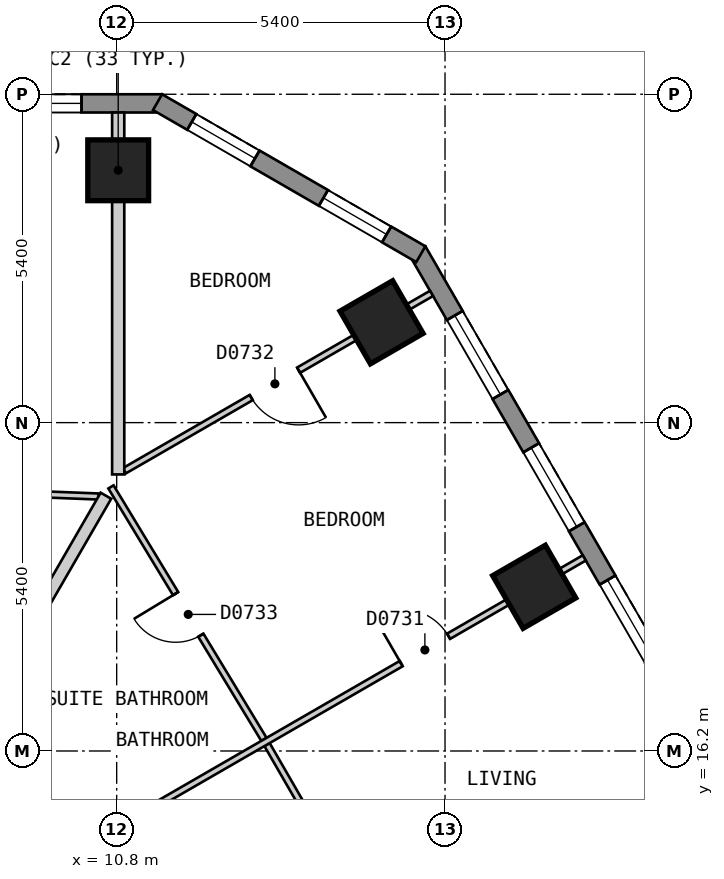
"""IFC4 building model, lengths in metres.
Left out: names, types, materials, properties, quantities, classifications, styles, units other than length and angle.
Written with IfcOpenShell. Run it as: python <this file> out.ifc"""

import sys

from ifc_helpers import new_model, si_unit, direction, frame, frame_2d, origin, origin_2d, place, context, subcontext, project, spatial, polyline, rectangle, outline, extrude, element, fill, save


model = new_model("IFC4")
c1 = context("Model", 3, precision=1e-05, world=origin(), true_north=direction((0.0, 1.0)))
c2 = subcontext(c1, "Body", "Model", "MODEL_VIEW")
j1 = project(units=[si_unit("LENGTHUNIT", "METRE"), si_unit("PLANEANGLEUNIT", "RADIAN")], contexts=[c1])
p1 = place(None, origin())
s1 = spatial("IfcSite", under=j1, at=p1, CompositionType="ELEMENT")
p2 = place(p1, origin())
s2 = spatial("IfcBuilding", under=s1, at=p2, CompositionType="ELEMENT")
p3 = place(p2, frame((0.0, 0.0, 105.0)))
s3 = spatial("IfcBuildingStorey", under=s2, at=p3, CompositionType="ELEMENT", Elevation=105.0)
for number, where, z_axis, x_axis in (
    (1, (10.825, 25.75, 0.0), (0.0, 0.0, 1.0), (-1.0, 0.0, 0.0)),
    (2, (17.667, 18.9, 0.0), (0.0, 0.0, 1.0), (-0.5, 0.866, 0.0)),
    (3, (15.156, 23.25, 0.0), (0.0, 0.0, 1.0), (-0.5, 0.866, 0.0)),
):
    element("IfcColumn", number, at=place(p3, frame(where, z_axis=z_axis, x_axis=x_axis)), inside=s3, PredefinedType="COLUMN", context=c2, shape_type="SweptSolid", body=[
        extrude(rectangle(XDim=1.0, YDim=1.0, at=origin_2d()), origin(), (0.0, 0.0, 1.0), 3.0),
    ])
p4 = place(p3, frame((11.547, 26.85, 0.0), z_axis=(0.0, 0.0, 1.0), x_axis=(-1.0, 0.0, 0.0)))
e4 = element("IfcWall", 4, at=p4, inside=s3, PredefinedType="SOLIDWALL", context=c2, shape_type="SweptSolid", body=[
    extrude(outline(polyline([(0.0, -0.15), (23.094, -0.15), (23.014, 0.15), (0.08, 0.15), (0.0, -0.15)])), origin(), (0.0, 0.0, 1.0), 2.6),
])
p5 = place(p4, frame((1.325, 0.0, 0.15)))
e5 = element("IfcOpeningElement", 5, at=p5, cuts=e4, PredefinedType="OPENING", context=c2, shape_type="SweptSolid", body=[
    extrude(rectangle(XDim=1.5, YDim=2.1, at=frame_2d((0.75, 1.05))), frame((0.0, 0.16, 0.0), z_axis=(0.0, -1.0, 0.0), x_axis=(1.0, 0.0, 0.0)), (0.0, 0.0, 1.0), 0.32),
])
p6 = place(p4, frame((4.032, 0.0, 0.15)))
e6 = element("IfcOpeningElement", 6, at=p6, cuts=e4, PredefinedType="OPENING", context=c2, shape_type="SweptSolid", body=[
    extrude(rectangle(XDim=1.5, YDim=2.1, at=frame_2d((0.75, 1.05))), frame((0.0, 0.16, 0.0), z_axis=(0.0, -1.0, 0.0), x_axis=(1.0, 0.0, 0.0)), (0.0, 0.0, 1.0), 0.32),
])
p7 = place(p4, frame((6.738, 0.0, 0.15)))
e7 = element("IfcOpeningElement", 7, at=p7, cuts=e4, PredefinedType="OPENING", context=c2, shape_type="SweptSolid", body=[
    extrude(rectangle(XDim=1.5, YDim=2.1, at=frame_2d((0.75, 1.05))), frame((0.0, 0.16, 0.0), z_axis=(0.0, -1.0, 0.0), x_axis=(1.0, 0.0, 0.0)), (0.0, 0.0, 1.0), 0.32),
])
p8 = place(p4, frame((9.445, 0.0, 0.15)))
e8 = element("IfcOpeningElement", 8, at=p8, cuts=e4, PredefinedType="OPENING", context=c2, shape_type="SweptSolid", body=[
    extrude(rectangle(XDim=1.5, YDim=2.1, at=frame_2d((0.75, 1.05))), frame((0.0, 0.16, 0.0), z_axis=(0.0, -1.0, 0.0), x_axis=(1.0, 0.0, 0.0)), (0.0, 0.0, 1.0), 0.32),
])
p9 = place(p4, frame((12.151, 0.0, 0.15)))
e9 = element("IfcOpeningElement", 9, at=p9, cuts=e4, PredefinedType="OPENING", context=c2, shape_type="SweptSolid", body=[
    extrude(rectangle(XDim=1.5, YDim=2.1, at=frame_2d((0.75, 1.05))), frame((0.0, 0.16, 0.0), z_axis=(0.0, -1.0, 0.0), x_axis=(1.0, 0.0, 0.0)), (0.0, 0.0, 1.0), 0.32),
])
p10 = place(p4, frame((14.858, 0.0, 0.15)))
e10 = element("IfcOpeningElement", 10, at=p10, cuts=e4, PredefinedType="OPENING", context=c2, shape_type="SweptSolid", body=[
    extrude(rectangle(XDim=1.5, YDim=2.1, at=frame_2d((0.75, 1.05))), frame((0.0, 0.16, 0.0), z_axis=(0.0, -1.0, 0.0), x_axis=(1.0, 0.0, 0.0)), (0.0, 0.0, 1.0), 0.32),
])
p11 = place(p4, frame((17.564, 0.0, 0.15)))
e11 = element("IfcOpeningElement", 11, at=p11, cuts=e4, PredefinedType="OPENING", context=c2, shape_type="SweptSolid", body=[
    extrude(rectangle(XDim=1.5, YDim=2.1, at=frame_2d((0.75, 1.05))), frame((0.0, 0.16, 0.0), z_axis=(0.0, -1.0, 0.0), x_axis=(1.0, 0.0, 0.0)), (0.0, 0.0, 1.0), 0.32),
])
p12 = place(p4, frame((20.271, 0.0, 0.15)))
e12 = element("IfcOpeningElement", 12, at=p12, cuts=e4, PredefinedType="OPENING", context=c2, shape_type="SweptSolid", body=[
    extrude(rectangle(XDim=1.5, YDim=2.1, at=frame_2d((0.75, 1.05))), frame((0.0, 0.16, 0.0), z_axis=(0.0, -1.0, 0.0), x_axis=(1.0, 0.0, 0.0)), (0.0, 0.0, 1.0), 0.32),
])
p13 = place(p3, frame((29.027, 1.425, 0.0), z_axis=(0.0, 0.0, 1.0), x_axis=(-0.500027479704, 0.866009537788, 0.0)))
e13 = element("IfcWall", 13, at=p13, inside=s3, PredefinedType="SOLIDWALL", context=c2, shape_type="SweptSolid", body=[
    extrude(outline(polyline([(0.0, -0.15), (26.559, -0.15), (26.478, 0.15), (0.08, 0.15), (0.0, -0.15)])), origin(), (0.0, 0.0, 1.0), 2.6),
])
p14 = place(p13, frame((1.227, 0.0, 0.15)))
e14 = element("IfcOpeningElement", 14, at=p14, cuts=e13, PredefinedType="OPENING", context=c2, shape_type="SweptSolid", body=[
    extrude(rectangle(XDim=1.5, YDim=2.1, at=frame_2d((0.75, 1.05))), frame((0.0, 0.16, 0.0), z_axis=(0.0, -1.0, 0.0), x_axis=(1.0, 0.0, 0.0)), (0.0, 0.0, 1.0), 0.32),
])
p15 = place(p13, frame((3.738, 0.0, 0.15)))
e15 = element("IfcOpeningElement", 15, at=p15, cuts=e13, PredefinedType="OPENING", context=c2, shape_type="SweptSolid", body=[
    extrude(rectangle(XDim=1.5, YDim=2.1, at=frame_2d((0.75, 1.05))), frame((0.0, 0.16, 0.0), z_axis=(0.0, -1.0, 0.0), x_axis=(1.0, 0.0, 0.0)), (0.0, 0.0, 1.0), 0.32),
])
p16 = place(p13, frame((6.25, 0.0, 0.15)))
e16 = element("IfcOpeningElement", 16, at=p16, cuts=e13, PredefinedType="OPENING", context=c2, shape_type="SweptSolid", body=[
    extrude(rectangle(XDim=1.5, YDim=2.1, at=frame_2d((0.75, 1.05))), frame((0.0, 0.16, 0.0), z_axis=(0.0, -1.0, 0.0), x_axis=(1.0, 0.0, 0.0)), (0.0, 0.0, 1.0), 0.32),
])
p17 = place(p13, frame((8.761, 0.0, 0.15)))
e17 = element("IfcOpeningElement", 17, at=p17, cuts=e13, PredefinedType="OPENING", context=c2, shape_type="SweptSolid", body=[
    extrude(rectangle(XDim=1.5, YDim=2.1, at=frame_2d((0.75, 1.05))), frame((0.0, 0.16, 0.0), z_axis=(0.0, -1.0, 0.0), x_axis=(1.0, 0.0, 0.0)), (0.0, 0.0, 1.0), 0.32),
])
p18 = place(p13, frame((11.273, 0.0, 0.15)))
e18 = element("IfcOpeningElement", 18, at=p18, cuts=e13, PredefinedType="OPENING", context=c2, shape_type="SweptSolid", body=[
    extrude(rectangle(XDim=1.5, YDim=2.1, at=frame_2d((0.75, 1.05))), frame((0.0, 0.16, 0.0), z_axis=(0.0, -1.0, 0.0), x_axis=(1.0, 0.0, 0.0)), (0.0, 0.0, 1.0), 0.32),
])
p19 = place(p13, frame((13.785, 0.0, 0.15)))
e19 = element("IfcOpeningElement", 19, at=p19, cuts=e13, PredefinedType="OPENING", context=c2, shape_type="SweptSolid", body=[
    extrude(rectangle(XDim=1.5, YDim=2.1, at=frame_2d((0.75, 1.05))), frame((0.0, 0.16, 0.0), z_axis=(0.0, -1.0, 0.0), x_axis=(1.0, 0.0, 0.0)), (0.0, 0.0, 1.0), 0.32),
])
p20 = place(p13, frame((16.296, 0.0, 0.15)))
e20 = element("IfcOpeningElement", 20, at=p20, cuts=e13, PredefinedType="OPENING", context=c2, shape_type="SweptSolid", body=[
    extrude(rectangle(XDim=1.5, YDim=2.1, at=frame_2d((0.75, 1.05))), frame((0.0, 0.16, 0.0), z_axis=(0.0, -1.0, 0.0), x_axis=(1.0, 0.0, 0.0)), (0.0, 0.0, 1.0), 0.32),
])
p21 = place(p13, frame((18.807, 0.0, 0.15)))
e21 = element("IfcOpeningElement", 21, at=p21, cuts=e13, PredefinedType="OPENING", context=c2, shape_type="SweptSolid", body=[
    extrude(rectangle(XDim=1.5, YDim=2.1, at=frame_2d((0.75, 1.05))), frame((0.0, 0.16, 0.0), z_axis=(0.0, -1.0, 0.0), x_axis=(1.0, 0.0, 0.0)), (0.0, 0.0, 1.0), 0.32),
])
p22 = place(p13, frame((21.319, 0.0, 0.15)))
e22 = element("IfcOpeningElement", 22, at=p22, cuts=e13, PredefinedType="OPENING", context=c2, shape_type="SweptSolid", body=[
    extrude(rectangle(XDim=1.5, YDim=2.1, at=frame_2d((0.75, 1.05))), frame((0.0, 0.16, 0.0), z_axis=(0.0, -1.0, 0.0), x_axis=(1.0, 0.0, 0.0)), (0.0, 0.0, 1.0), 0.32),
])
p23 = place(p13, frame((23.831, 0.0, 0.15)))
e23 = element("IfcOpeningElement", 23, at=p23, cuts=e13, PredefinedType="OPENING", context=c2, shape_type="SweptSolid", body=[
    extrude(rectangle(XDim=1.5, YDim=2.1, at=frame_2d((0.75, 1.05))), frame((0.0, 0.16, 0.0), z_axis=(0.0, -1.0, 0.0), x_axis=(1.0, 0.0, 0.0)), (0.0, 0.0, 1.0), 0.32),
])
p24 = place(p3, frame((15.802, 24.37, 0.0), z_axis=(0.0, 0.0, 1.0), x_axis=(-0.866022959057, 0.500004234368, 0.0)))
e24 = element("IfcWall", 24, at=p24, inside=s3, PredefinedType="SOLIDWALL", context=c2, shape_type="SweptSolid", body=[
    extrude(outline(polyline([(0.0, -0.15), (5.0, -0.15), (4.92, 0.15), (0.08, 0.15), (0.0, -0.15)])), origin(), (0.0, 0.0, 1.0), 2.6),
])
p25 = place(p24, frame((0.65, 0.0, 0.15)))
e25 = element("IfcOpeningElement", 25, at=p25, cuts=e24, PredefinedType="OPENING", context=c2, shape_type="SweptSolid", body=[
    extrude(rectangle(XDim=1.2, YDim=2.1, at=frame_2d((0.6, 1.05))), frame((0.0, 0.16, 0.0), z_axis=(0.0, -1.0, 0.0), x_axis=(1.0, 0.0, 0.0)), (0.0, 0.0, 1.0), 0.32),
])
p26 = place(p24, frame((3.15, 0.0, 0.15)))
e26 = element("IfcOpeningElement", 26, at=p26, cuts=e24, PredefinedType="OPENING", context=c2, shape_type="SweptSolid", body=[
    extrude(rectangle(XDim=1.2, YDim=2.1, at=frame_2d((0.6, 1.05))), frame((0.0, 0.16, 0.0), z_axis=(0.0, -1.0, 0.0), x_axis=(1.0, 0.0, 0.0)), (0.0, 0.0, 1.0), 0.32),
])
p27 = place(p3, frame((8.488, 16.5, 0.0), z_axis=(0.0, 0.0, 1.0), x_axis=(0.499986836607, -0.86603300354, 0.0)))
e27 = element("IfcWall", 27, at=p27, inside=s3, PredefinedType="PARTITIONING", context=c2, shape_type="SweptSolid", body=[
    extrude(rectangle(XDim=20.09, YDim=0.2, at=frame_2d((10.045, 0.0))), origin(), (0.0, 0.0, 1.0), 2.6),
])
p28 = place(p27, frame((14.569, 0.0, 0.0)))
e28 = element("IfcOpeningElement", 28, at=p28, cuts=e27, PredefinedType="OPENING", context=c2, shape_type="SweptSolid", body=[
    extrude(rectangle(XDim=1.0, YDim=2.1, at=frame_2d((0.5, 1.05))), frame((0.0, 0.11, 0.0), z_axis=(0.0, -1.0, 0.0), x_axis=(1.0, 0.0, 0.0)), (0.0, 0.0, 1.0), 0.22),
])
p29 = place(p27, frame((4.547, 0.0, 0.0)))
e29 = element("IfcOpeningElement", 29, at=p29, cuts=e27, PredefinedType="OPENING", context=c2, shape_type="SweptSolid", body=[
    extrude(rectangle(XDim=1.0, YDim=2.1, at=frame_2d((0.5, 1.05))), frame((0.0, 0.11, 0.0), z_axis=(0.0, -1.0, 0.0), x_axis=(1.0, 0.0, 0.0)), (0.0, 0.0, 1.0), 0.22),
])
p30 = place(p3, frame((10.706, 20.543, 0.0), z_axis=(0.0, 0.0, 1.0), x_axis=(0.518240414093, -0.855234981278, 0.0)))
e30 = element("IfcWall", 30, at=p30, inside=s3, PredefinedType="PARTITIONING", context=c2, shape_type="SweptSolid", body=[
    extrude(rectangle(XDim=4.855, YDim=0.1, at=frame_2d((2.427, 0.0))), origin(), (0.0, 0.0, 1.0), 2.6),
])
p31 = place(p30, frame((2.052, 0.0, 0.0)))
e31 = element("IfcOpeningElement", 31, at=p31, cuts=e30, PredefinedType="OPENING", context=c2, shape_type="SweptSolid", body=[
    extrude(rectangle(XDim=0.8, YDim=2.1, at=frame_2d((0.4, 1.05))), frame((0.0, 0.06, 0.0), z_axis=(0.0, -1.0, 0.0), x_axis=(1.0, 0.0, 0.0)), (0.0, 0.0, 1.0), 0.12),
])
p32 = place(p3, frame((13.273, 16.305, 0.0), z_axis=(0.0, 0.0, 1.0), x_axis=(0.500093956194, -0.865971151354, 0.0)))
e32 = element("IfcWall", 32, at=p32, inside=s3, PredefinedType="PARTITIONING", context=c2, shape_type="SweptSolid", body=[
    extrude(rectangle(XDim=4.873, YDim=0.1, at=frame_2d((2.437, 0.0))), origin(), (0.0, 0.0, 1.0), 2.6),
])
p33 = place(p32, frame((1.987, 0.0, 0.0)))
e33 = element("IfcOpeningElement", 33, at=p33, cuts=e32, PredefinedType="OPENING", context=c2, shape_type="SweptSolid", body=[
    extrude(rectangle(XDim=0.9, YDim=2.1, at=frame_2d((0.45, 1.05))), frame((0.0, 0.06, 0.0), z_axis=(0.0, -1.0, 0.0), x_axis=(1.0, 0.0, 0.0)), (0.0, 0.0, 1.0), 0.12),
])
p34 = place(p3, frame((8.06, 20.48, 0.0), z_axis=(0.0, 0.0, 1.0), x_axis=(0.999243345912, -0.038893902497, 0.0)))
e34 = element("IfcWall", 34, at=p34, inside=s3, PredefinedType="PARTITIONING", context=c2, shape_type="SweptSolid", body=[
    extrude(rectangle(XDim=2.442, YDim=0.1, at=frame_2d((1.221, 0.0))), origin(), (0.0, 0.0, 1.0), 2.6),
])
p35 = place(p3, frame((9.83, 14.375, 0.0), z_axis=(0.0, 0.0, 1.0), x_axis=(0.866016855193, 0.500014806302, 0.0)))
e35 = element("IfcWall", 35, at=p35, inside=s3, PredefinedType="PARTITIONING", context=c2, shape_type="SweptSolid", body=[
    extrude(rectangle(XDim=10.0, YDim=0.1, at=frame_2d((5.0, 0.0))), origin(), (0.0, 0.0, 1.0), 2.6),
])
p36 = place(p35, frame((6.523, 0.0, 0.0)))
e36 = element("IfcOpeningElement", 36, at=p36, cuts=e35, PredefinedType="OPENING", context=c2, shape_type="SweptSolid", body=[
    extrude(rectangle(XDim=0.9, YDim=2.1, at=frame_2d((0.45, 1.05))), frame((0.0, 0.06, 0.0), z_axis=(0.0, -1.0, 0.0), x_axis=(1.0, 0.0, 0.0)), (0.0, 0.0, 1.0), 0.12),
])
p37 = place(p3, frame((10.926, 20.808, 0.0), z_axis=(0.0, 0.0, 1.0), x_axis=(0.86600925905, 0.500027962457, 0.0)))
e37 = element("IfcWall", 37, at=p37, inside=s3, PredefinedType="PARTITIONING", context=c2, shape_type="SweptSolid", body=[
    extrude(rectangle(XDim=5.834, YDim=0.1, at=frame_2d((2.917, 0.0))), origin(), (0.0, 0.0, 1.0), 2.6),
])
p38 = place(p37, frame((2.409, 0.0, 0.0)))
e38 = element("IfcOpeningElement", 38, at=p38, cuts=e37, PredefinedType="OPENING", context=c2, shape_type="SweptSolid", body=[
    extrude(rectangle(XDim=0.9, YDim=2.1, at=frame_2d((0.45, 1.05))), frame((0.0, 0.06, 0.0), z_axis=(0.0, -1.0, 0.0), x_axis=(1.0, 0.0, 0.0)), (0.0, 0.0, 1.0), 0.12),
])
p39 = place(p3, frame((8.43, 16.6, 0.0), z_axis=(0.0, 0.0, 1.0), x_axis=(0.500072613115, 0.865983476524, 0.0)))
e39 = element("IfcWall", 39, at=p39, inside=s3, PredefinedType="PARTITIONING", context=c2, shape_type="SweptSolid", body=[
    extrude(rectangle(XDim=4.385, YDim=0.2, at=frame_2d((2.193, 0.0))), origin(), (0.0, 0.0, 1.0), 2.6),
])
p40 = place(p3, frame((10.825, 20.748, 0.0), z_axis=(0.0, 0.0, 1.0), x_axis=(0.0, 1.0, 0.0)))
e40 = element("IfcWall", 40, at=p40, inside=s3, PredefinedType="PARTITIONING", context=c2, shape_type="SweptSolid", body=[
    extrude(rectangle(XDim=5.952, YDim=0.2, at=frame_2d((2.976, 0.0))), origin(), (0.0, 0.0, 1.0), 2.6),
])
p41 = place(p5, origin())
e41 = element("IfcWindow", 41, at=p41, inside=s3, PartitioningType="SINGLE_PANEL", PredefinedType="WINDOW", context=c2, shape_type="SweptSolid", body=[
    extrude(rectangle(XDim=1.5, YDim=2.1, at=frame_2d((0.75, 1.05))), frame((0.0, 0.03, 0.0), z_axis=(0.0, -1.0, 0.0), x_axis=(1.0, 0.0, 0.0)), (0.0, 0.0, 1.0), 0.06),
])
fill(e5, e41)
p42 = place(p21, origin())
e42 = element("IfcWindow", 42, at=p42, inside=s3, PartitioningType="SINGLE_PANEL", PredefinedType="WINDOW", context=c2, shape_type="SweptSolid", body=[
    extrude(rectangle(XDim=1.5, YDim=2.1, at=frame_2d((0.75, 1.05))), frame((0.0, 0.03, 0.0), z_axis=(0.0, -1.0, 0.0), x_axis=(1.0, 0.0, 0.0)), (0.0, 0.0, 1.0), 0.06),
])
fill(e21, e42)
p43 = place(p22, origin())
e43 = element("IfcWindow", 43, at=p43, inside=s3, PartitioningType="SINGLE_PANEL", PredefinedType="WINDOW", context=c2, shape_type="SweptSolid", body=[
    extrude(rectangle(XDim=1.5, YDim=2.1, at=frame_2d((0.75, 1.05))), frame((0.0, 0.03, 0.0), z_axis=(0.0, -1.0, 0.0), x_axis=(1.0, 0.0, 0.0)), (0.0, 0.0, 1.0), 0.06),
])
fill(e22, e43)
p44 = place(p23, origin())
e44 = element("IfcWindow", 44, at=p44, inside=s3, PartitioningType="SINGLE_PANEL", PredefinedType="WINDOW", context=c2, shape_type="SweptSolid", body=[
    extrude(rectangle(XDim=1.5, YDim=2.1, at=frame_2d((0.75, 1.05))), frame((0.0, 0.03, 0.0), z_axis=(0.0, -1.0, 0.0), x_axis=(1.0, 0.0, 0.0)), (0.0, 0.0, 1.0), 0.06),
])
fill(e23, e44)
p45 = place(p25, origin())
e45 = element("IfcWindow", 45, at=p45, inside=s3, PartitioningType="SINGLE_PANEL", PredefinedType="WINDOW", context=c2, shape_type="SweptSolid", body=[
    extrude(rectangle(XDim=1.2, YDim=2.1, at=frame_2d((0.6, 1.05))), frame((0.0, 0.03, 0.0), z_axis=(0.0, -1.0, 0.0), x_axis=(1.0, 0.0, 0.0)), (0.0, 0.0, 1.0), 0.06),
])
fill(e25, e45)
p46 = place(p26, origin())
e46 = element("IfcWindow", 46, at=p46, inside=s3, PartitioningType="SINGLE_PANEL", PredefinedType="WINDOW", context=c2, shape_type="SweptSolid", body=[
    extrude(rectangle(XDim=1.2, YDim=2.1, at=frame_2d((0.6, 1.05))), frame((0.0, 0.03, 0.0), z_axis=(0.0, -1.0, 0.0), x_axis=(1.0, 0.0, 0.0)), (0.0, 0.0, 1.0), 0.06),
])
fill(e26, e46)
p47 = place(p36, origin())
e47 = element("IfcDoor", 47, at=p47, inside=s3, OperationType="SINGLE_SWING_LEFT", PredefinedType="DOOR", context=c2, shape_type="SweptSolid", body=[
    extrude(rectangle(XDim=0.9, YDim=2.1, at=frame_2d((0.45, 1.05))), frame((0.0, 0.025, 0.0), z_axis=(0.0, -1.0, 0.0), x_axis=(1.0, 0.0, 0.0)), (0.0, 0.0, 1.0), 0.05),
])
fill(e36, e47)
p48 = place(p38, origin())
e48 = element("IfcDoor", 48, at=p48, inside=s3, OperationType="SINGLE_SWING_RIGHT", PredefinedType="DOOR", context=c2, shape_type="SweptSolid", body=[
    extrude(rectangle(XDim=0.9, YDim=2.1, at=frame_2d((0.45, 1.05))), frame((0.0, 0.025, 0.0), z_axis=(0.0, -1.0, 0.0), x_axis=(1.0, 0.0, 0.0)), (0.0, 0.0, 1.0), 0.05),
])
fill(e38, e48)
p49 = place(p31, origin())
e49 = element("IfcDoor", 49, at=p49, inside=s3, OperationType="SINGLE_SWING_LEFT", PredefinedType="DOOR", context=c2, shape_type="SweptSolid", body=[
    extrude(rectangle(XDim=0.8, YDim=2.1, at=frame_2d((0.4, 1.05))), frame((0.0, 0.025, 0.0), z_axis=(0.0, -1.0, 0.0), x_axis=(1.0, 0.0, 0.0)), (0.0, 0.0, 1.0), 0.05),
])
fill(e31, e49)
save(model, sys.argv[1])
